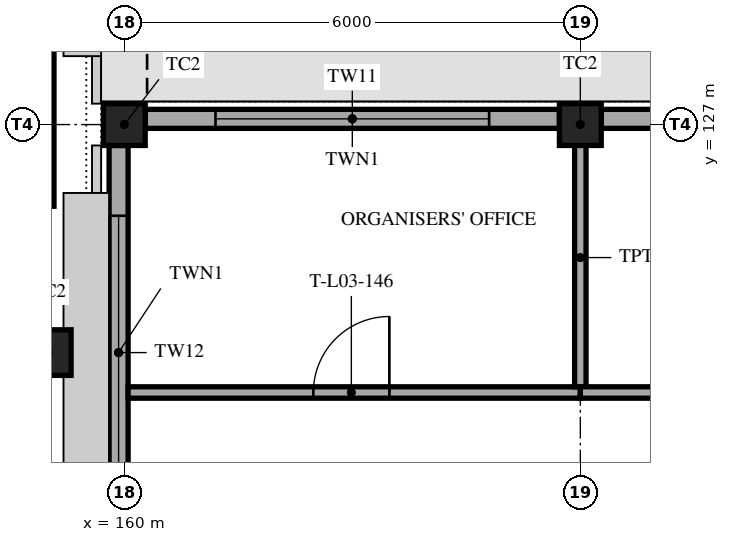
"""IFC4 building model, lengths in metres.
Left out: names, types, materials, properties, quantities, classifications, styles, units other than length and angle.
Written with IfcOpenShell. Run it as: python <this file> out.ifc"""

import sys

from ifc_helpers import new_model, si_unit, direction, frame, frame_2d, origin, origin_2d, place, context, subcontext, project, spatial, polyline, rectangle, hollow_rectangle, outline, extrude, element, fill, save


model = new_model("IFC4")
c1 = context("Model", 3, precision=1e-05, world=origin(), true_north=direction((0.0, 1.0)))
c2 = subcontext(c1, "Body", "Model", "MODEL_VIEW")
j1 = project(units=[si_unit("LENGTHUNIT", "METRE"), si_unit("PLANEANGLEUNIT", "RADIAN")], contexts=[c1])
p1 = place(None, origin())
s1 = spatial("IfcSite", under=j1, at=p1, CompositionType="ELEMENT")
p2 = place(p1, origin())
s2 = spatial("IfcBuilding", under=s1, at=p2, CompositionType="ELEMENT")
p3 = place(p2, frame((0.0, 0.0, 15.0)))
s3 = spatial("IfcBuildingStorey", under=s2, at=p3, CompositionType="ELEMENT", Elevation=15.0)
for number, where, z_axis, x_axis in (
    (1, (160.0, 127.0, 0.0), (0.0, 0.0, 1.0), (1.0, 0.0, 0.0)),
    (2, (166.0, 127.0, 0.0), (0.0, 0.0, 1.0), (1.0, 0.0, 0.0)),
):
    element("IfcColumn", number, at=place(p3, frame(where, z_axis=z_axis, x_axis=x_axis)), inside=s3, PredefinedType="COLUMN", context=c2, shape_type="SweptSolid", body=[
        extrude(hollow_rectangle(XDim=0.55, YDim=0.55, WallThickness=0.032, at=origin_2d()), origin(), (0.0, 0.0, 1.0), 4.2),
    ])
p4 = place(p3, frame((159.0, 124.0, 0.0), z_axis=(0.0, 0.0, 1.0), x_axis=(1.0, 0.0, 0.0)))
e3 = element("IfcColumn", 3, at=p4, inside=s3, PredefinedType="COLUMN", context=c2, shape_type="SweptSolid", body=[
    extrude(rectangle(XDim=0.6, YDim=0.6, at=origin_2d()), origin(), (0.0, 0.0, 1.0), 4.2),
])
p5 = place(p3, frame((160.275, 127.075, 0.0), z_axis=(0.0, 0.0, 1.0), x_axis=(1.0, 0.0, 0.0)))
e4 = element("IfcWall", 4, at=p5, inside=s3, PredefinedType="SOLIDWALL", context=c2, shape_type="SweptSolid", body=[
    extrude(rectangle(XDim=5.45, YDim=0.25, at=frame_2d((2.725, 0.0))), origin(), (0.0, 0.0, 1.0), 3.55),
])
p6 = place(p5, frame((0.925, 0.0, 0.9)))
e5 = element("IfcOpeningElement", 5, at=p6, cuts=e4, PredefinedType="OPENING", context=c2, shape_type="SweptSolid", body=[
    extrude(rectangle(XDim=3.6, YDim=2.4, at=frame_2d((1.8, 1.2))), frame((0.0, 0.135, 0.0), z_axis=(0.0, -1.0, 0.0), x_axis=(1.0, 0.0, 0.0)), (0.0, 0.0, 1.0), 0.27),
])
p7 = place(p3, frame((159.925, 121.275, 0.0), z_axis=(0.0, 0.0, 1.0), x_axis=(0.0, 1.0, 0.0)))
e6 = element("IfcWall", 6, at=p7, inside=s3, PredefinedType="SOLIDWALL", context=c2, shape_type="SweptSolid", body=[
    extrude(rectangle(XDim=5.45, YDim=0.25, at=frame_2d((2.725, 0.0))), origin(), (0.0, 0.0, 1.0), 3.55),
])
p8 = place(p7, frame((0.925, 0.0, 0.9)))
e7 = element("IfcOpeningElement", 7, at=p8, cuts=e6, PredefinedType="OPENING", context=c2, shape_type="SweptSolid", body=[
    extrude(rectangle(XDim=3.6, YDim=2.4, at=frame_2d((1.8, 1.2))), frame((0.0, 0.135, 0.0), z_axis=(0.0, -1.0, 0.0), x_axis=(1.0, 0.0, 0.0)), (0.0, 0.0, 1.0), 0.27),
])
p9 = place(p3, frame((159.925, 127.275, 0.0), z_axis=(0.0, 0.0, 1.0), x_axis=(0.0, 1.0, 0.0)))
e8 = element("IfcWall", 8, at=p9, inside=s3, PredefinedType="SOLIDWALL", context=c2, shape_type="SweptSolid", body=[
    extrude(rectangle(XDim=5.45, YDim=0.25, at=frame_2d((2.725, 0.0))), origin(), (0.0, 0.0, 1.0), 3.55),
])
p10 = place(p9, frame((0.925, 0.0, 0.9)))
e9 = element("IfcOpeningElement", 9, at=p10, cuts=e8, PredefinedType="OPENING", context=c2, shape_type="SweptSolid", body=[
    extrude(rectangle(XDim=3.6, YDim=2.4, at=frame_2d((1.8, 1.2))), frame((0.0, 0.135, 0.0), z_axis=(0.0, -1.0, 0.0), x_axis=(1.0, 0.0, 0.0)), (0.0, 0.0, 1.0), 0.27),
])
p11 = place(p3, frame((166.275, 127.075, 0.0), z_axis=(0.0, 0.0, 1.0), x_axis=(1.0, 0.0, 0.0)))
e10 = element("IfcWall", 10, at=p11, inside=s3, PredefinedType="SOLIDWALL", context=c2, shape_type="SweptSolid", body=[
    extrude(rectangle(XDim=5.45, YDim=0.25, at=frame_2d((2.725, 0.0))), origin(), (0.0, 0.0, 1.0), 3.55),
])
p12 = place(p11, frame((1.525, 0.0, 0.0)))
e11 = element("IfcOpeningElement", 11, at=p12, cuts=e10, PredefinedType="OPENING", context=c2, shape_type="SweptSolid", body=[
    extrude(rectangle(XDim=2.4, YDim=2.1, at=frame_2d((1.2, 1.05))), frame((0.0, 0.135, 0.0), z_axis=(0.0, -1.0, 0.0), x_axis=(1.0, 0.0, 0.0)), (0.0, 0.0, 1.0), 0.27),
])
p13 = place(p3, frame((160.05, 123.475, 0.0), z_axis=(0.0, 0.0, 1.0), x_axis=(1.0, 0.0, 0.0)))
e12 = element("IfcWall", 12, at=p13, inside=s3, PredefinedType="PARTITIONING", context=c2, shape_type="SweptSolid", body=[
    extrude(rectangle(XDim=5.95, YDim=0.15, at=frame_2d((2.975, 0.0))), origin(), (0.0, 0.0, 1.0), 3.4),
])
p14 = place(p13, frame((2.438, 0.0, 0.0)))
e13 = element("IfcOpeningElement", 13, at=p14, cuts=e12, PredefinedType="OPENING", context=c2, shape_type="SweptSolid", body=[
    extrude(rectangle(XDim=1.0, YDim=2.1, at=frame_2d((0.5, 1.05))), frame((0.0, 0.085, 0.0), z_axis=(0.0, -1.0, 0.0), x_axis=(1.0, 0.0, 0.0)), (0.0, 0.0, 1.0), 0.17),
])
p15 = place(p3, frame((166.0, 123.55, 0.0), z_axis=(0.0, 0.0, 1.0), x_axis=(0.0, 1.0, 0.0)))
e14 = element("IfcWall", 14, at=p15, inside=s3, PredefinedType="PARTITIONING", context=c2, shape_type="SweptSolid", body=[
    extrude(rectangle(XDim=3.4, YDim=0.15, at=frame_2d((1.7, 0.0))), origin(), (0.0, 0.0, 1.0), 3.4),
])
p16 = place(p3, frame((166.0, 123.475, 0.0), z_axis=(0.0, 0.0, 1.0), x_axis=(1.0, 0.0, 0.0)))
e15 = element("IfcWall", 15, at=p16, inside=s3, PredefinedType="PARTITIONING", context=c2, shape_type="SweptSolid", body=[
    extrude(rectangle(XDim=6.0, YDim=0.15, at=frame_2d((3.0, 0.0))), origin(), (0.0, 0.0, 1.0), 3.4),
])
p17 = place(p16, frame((2.5, 0.0, 0.0)))
e16 = element("IfcOpeningElement", 16, at=p17, cuts=e15, PredefinedType="OPENING", context=c2, shape_type="SweptSolid", body=[
    extrude(rectangle(XDim=1.0, YDim=2.1, at=frame_2d((0.5, 1.05))), frame((0.0, 0.085, 0.0), z_axis=(0.0, -1.0, 0.0), x_axis=(1.0, 0.0, 0.0)), (0.0, 0.0, 1.0), 0.17),
])
p18 = place(p3, frame((159.0, 125.925, 0.0), z_axis=(0.0, 0.0, 1.0), x_axis=(0.0, 1.0, 0.0)))
e17 = element("IfcWall", 17, at=p18, inside=s3, PredefinedType="PARTITIONING", context=c2, shape_type="SweptSolid", body=[
    extrude(rectangle(XDim=6.675, YDim=0.15, at=frame_2d((3.337, 0.0))), origin(), (0.0, 0.0, 1.0), 4.2),
])
p19 = place(p6, origin())
e18 = element("IfcWindow", 18, at=p19, inside=s3, PartitioningType="TRIPLE_PANEL_VERTICAL", PredefinedType="WINDOW", context=c2, shape_type="SweptSolid", body=[
    extrude(outline(polyline([(0.0, 0.0), (3.6, 0.0), (3.6, 2.4), (0.0, 2.4), (0.0, 0.0)]), holes=[polyline([(0.06, 0.06), (0.96, 0.06), (0.96, 2.34), (0.06, 2.34), (0.06, 0.06)]), polyline([(1.06, 0.06), (2.54, 0.06), (2.54, 2.34), (1.06, 2.34), (1.06, 0.06)]), polyline([(2.64, 0.06), (3.54, 0.06), (3.54, 2.34), (2.64, 2.34), (2.64, 0.06)])]), frame((0.0, 0.03, 0.0), z_axis=(0.0, -1.0, 0.0), x_axis=(1.0, 0.0, 0.0)), (0.0, 0.0, 1.0), 0.06),
    extrude(rectangle(XDim=0.924, YDim=2.304, at=frame_2d((0.51, 1.2))), frame((0.0, 0.01, 0.0), z_axis=(0.0, -1.0, 0.0), x_axis=(1.0, 0.0, 0.0)), (0.0, 0.0, 1.0), 0.02),
    extrude(rectangle(XDim=1.504, YDim=2.304, at=frame_2d((1.8, 1.2))), frame((0.0, 0.01, 0.0), z_axis=(0.0, -1.0, 0.0), x_axis=(1.0, 0.0, 0.0)), (0.0, 0.0, 1.0), 0.02),
    extrude(rectangle(XDim=0.924, YDim=2.304, at=frame_2d((3.09, 1.2))), frame((0.0, 0.01, 0.0), z_axis=(0.0, -1.0, 0.0), x_axis=(1.0, 0.0, 0.0)), (0.0, 0.0, 1.0), 0.02),
])
fill(e5, e18)
p20 = place(p8, origin())
e19 = element("IfcWindow", 19, at=p20, inside=s3, PartitioningType="TRIPLE_PANEL_VERTICAL", PredefinedType="WINDOW", context=c2, shape_type="SweptSolid", body=[
    extrude(outline(polyline([(0.0, 0.0), (3.6, 0.0), (3.6, 2.4), (0.0, 2.4), (0.0, 0.0)]), holes=[polyline([(0.06, 0.06), (0.96, 0.06), (0.96, 2.34), (0.06, 2.34), (0.06, 0.06)]), polyline([(1.06, 0.06), (2.54, 0.06), (2.54, 2.34), (1.06, 2.34), (1.06, 0.06)]), polyline([(2.64, 0.06), (3.54, 0.06), (3.54, 2.34), (2.64, 2.34), (2.64, 0.06)])]), frame((0.0, 0.03, 0.0), z_axis=(0.0, -1.0, 0.0), x_axis=(1.0, 0.0, 0.0)), (0.0, 0.0, 1.0), 0.06),
    extrude(rectangle(XDim=0.924, YDim=2.304, at=frame_2d((0.51, 1.2))), frame((0.0, 0.01, 0.0), z_axis=(0.0, -1.0, 0.0), x_axis=(1.0, 0.0, 0.0)), (0.0, 0.0, 1.0), 0.02),
    extrude(rectangle(XDim=1.504, YDim=2.304, at=frame_2d((1.8, 1.2))), frame((0.0, 0.01, 0.0), z_axis=(0.0, -1.0, 0.0), x_axis=(1.0, 0.0, 0.0)), (0.0, 0.0, 1.0), 0.02),
    extrude(rectangle(XDim=0.924, YDim=2.304, at=frame_2d((3.09, 1.2))), frame((0.0, 0.01, 0.0), z_axis=(0.0, -1.0, 0.0), x_axis=(1.0, 0.0, 0.0)), (0.0, 0.0, 1.0), 0.02),
])
fill(e7, e19)
p21 = place(p14, origin())
e20 = element("IfcDoor", 20, at=p21, inside=s3, OperationType="SINGLE_SWING_RIGHT", PredefinedType="DOOR", context=c2, shape_type="SweptSolid", body=[
    extrude(rectangle(XDim=1.0, YDim=2.1, at=frame_2d((0.5, 1.05))), frame((0.0, 0.025, 0.0), z_axis=(0.0, -1.0, 0.0), x_axis=(1.0, 0.0, 0.0)), (0.0, 0.0, 1.0), 0.05),
])
fill(e13, e20)
save(model, sys.argv[1])
